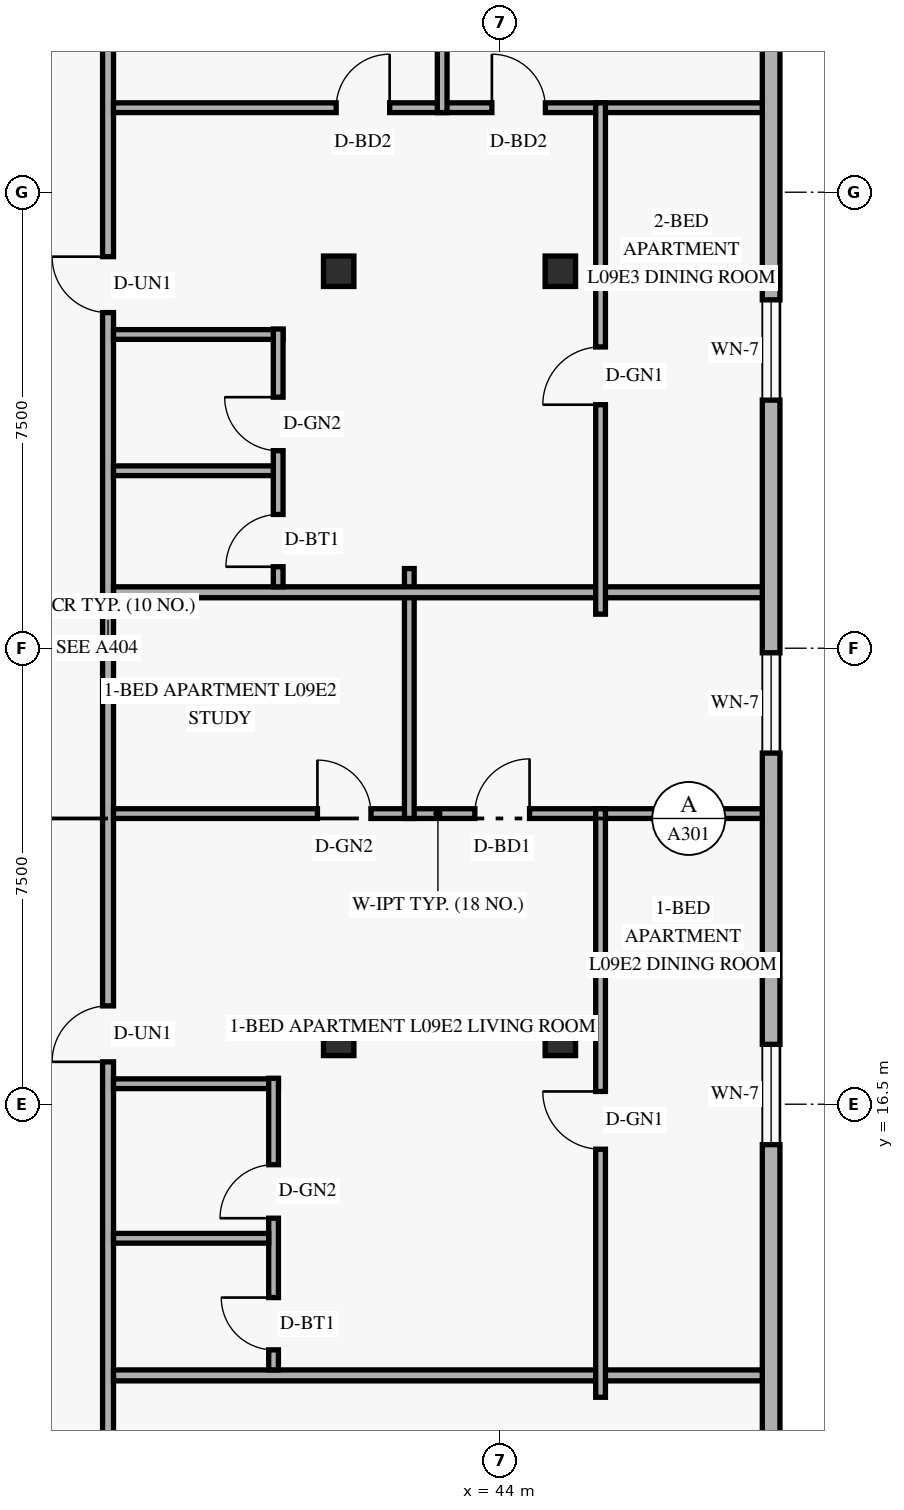
"""IFC4 building model, lengths in metres.
Left out: names, types, materials, properties, quantities, classifications, styles, units other than length and angle.
Written with IfcOpenShell. Run it as: python <this file> out.ifc"""

import sys

from ifc_helpers import new_model, si_unit, direction, frame, frame_2d, origin, origin_2d, place, context, subcontext, project, spatial, rectangle, hollow_rectangle, extrude, element, fill, save


model = new_model("IFC4")
c1 = context("Model", 3, precision=1e-05, world=origin(), true_north=direction((0.0, 1.0)))
c2 = subcontext(c1, "Body", "Model", "MODEL_VIEW")
j1 = project(units=[si_unit("LENGTHUNIT", "METRE"), si_unit("PLANEANGLEUNIT", "RADIAN")], contexts=[c1])
p1 = place(None, origin())
s1 = spatial("IfcSite", under=j1, at=p1, CompositionType="ELEMENT")
p2 = place(p1, origin())
s2 = spatial("IfcBuilding", under=s1, at=p2, CompositionType="ELEMENT")
p3 = place(p2, frame((0.0, 0.0, 38.4)))
s3 = spatial("IfcBuildingStorey", under=s2, at=p3, CompositionType="ELEMENT", Elevation=38.4)
for number, where, z_axis, x_axis in (
    (1, (41.28, 17.55, 0.0), (0.035, 0.0, 0.999), (0.0, 1.0, 0.0)),
    (2, (41.28, 30.2, 0.0), (0.035, 0.0, 0.999), (0.0, 1.0, 0.0)),
):
    element("IfcColumn", number, at=place(p3, frame(where, z_axis=z_axis, x_axis=x_axis)), inside=s3, PredefinedType="COLUMN", context=c2, shape_type="SweptSolid", body=[
        extrude(hollow_rectangle(XDim=0.5, YDim=0.5, WallThickness=0.022, at=origin_2d()), origin(), (0.0, 0.0, 1.0), 3.602),
    ])
for number, where, z_axis, x_axis in (
    (3, (44.884, 17.55, 0.0), (0.058, 0.0, 0.998), (0.0, 1.0, 0.0)),
    (4, (44.884, 30.2, 0.0), (0.058, 0.0, 0.998), (0.0, 1.0, 0.0)),
):
    element("IfcColumn", number, at=place(p3, frame(where, z_axis=z_axis, x_axis=x_axis)), inside=s3, PredefinedType="COLUMN", context=c2, shape_type="SweptSolid", body=[
        extrude(hollow_rectangle(XDim=0.5, YDim=0.5, WallThickness=0.022, at=origin_2d()), origin(), (0.0, 0.0, 1.0), 3.606),
    ])
p4 = place(p3, frame((48.455, 4.62, 0.0), z_axis=(0.0, 0.0, 1.0), x_axis=(0.0, 1.0, 0.0)))
e5 = element("IfcWall", 5, at=p4, inside=s3, PredefinedType="SOLIDWALL", context=c2, shape_type="SweptSolid", body=[
    extrude(rectangle(XDim=38.76, YDim=0.29, at=frame_2d((19.38, 0.0))), origin(), (0.0, 0.0, 1.0), 3.36),
])
p5 = place(p4, frame((2.885, 0.0, 0.85)))
e6 = element("IfcOpeningElement", 6, at=p5, cuts=e5, PredefinedType="OPENING", context=c2, shape_type="SweptSolid", body=[
    extrude(rectangle(XDim=1.65, YDim=1.6, at=frame_2d((0.825, 0.8))), frame((0.0, 0.155, 0.0), z_axis=(0.0, -1.0, 0.0), x_axis=(1.0, 0.0, 0.0)), (0.0, 0.0, 1.0), 0.31),
])
p6 = place(p4, frame((11.215, 0.0, 0.85)))
e7 = element("IfcOpeningElement", 7, at=p6, cuts=e5, PredefinedType="OPENING", context=c2, shape_type="SweptSolid", body=[
    extrude(rectangle(XDim=1.65, YDim=1.6, at=frame_2d((0.825, 0.8))), frame((0.0, 0.155, 0.0), z_axis=(0.0, -1.0, 0.0), x_axis=(1.0, 0.0, 0.0)), (0.0, 0.0, 1.0), 0.31),
])
p7 = place(p4, frame((17.655, 0.0, 0.85)))
e8 = element("IfcOpeningElement", 8, at=p7, cuts=e5, PredefinedType="OPENING", context=c2, shape_type="SweptSolid", body=[
    extrude(rectangle(XDim=1.65, YDim=1.6, at=frame_2d((0.825, 0.8))), frame((0.0, 0.155, 0.0), z_axis=(0.0, -1.0, 0.0), x_axis=(1.0, 0.0, 0.0)), (0.0, 0.0, 1.0), 0.31),
])
p8 = place(p4, frame((23.46, 0.0, 0.85)))
e9 = element("IfcOpeningElement", 9, at=p8, cuts=e5, PredefinedType="OPENING", context=c2, shape_type="SweptSolid", body=[
    extrude(rectangle(XDim=1.65, YDim=1.6, at=frame_2d((0.825, 0.8))), frame((0.0, 0.155, 0.0), z_axis=(0.0, -1.0, 0.0), x_axis=(1.0, 0.0, 0.0)), (0.0, 0.0, 1.0), 0.31),
])
p9 = place(p4, frame((29.44, 0.0, 0.85)))
e10 = element("IfcOpeningElement", 10, at=p9, cuts=e5, PredefinedType="OPENING", context=c2, shape_type="SweptSolid", body=[
    extrude(rectangle(XDim=1.65, YDim=1.6, at=frame_2d((0.825, 0.8))), frame((0.0, 0.155, 0.0), z_axis=(0.0, -1.0, 0.0), x_axis=(1.0, 0.0, 0.0)), (0.0, 0.0, 1.0), 0.31),
])
p10 = place(p4, frame((34.685, 0.0, 0.85)))
e11 = element("IfcOpeningElement", 11, at=p10, cuts=e5, PredefinedType="OPENING", context=c2, shape_type="SweptSolid", body=[
    extrude(rectangle(XDim=1.65, YDim=1.6, at=frame_2d((0.825, 0.8))), frame((0.0, 0.155, 0.0), z_axis=(0.0, -1.0, 0.0), x_axis=(1.0, 0.0, 0.0)), (0.0, 0.0, 1.0), 0.31),
])
p11 = place(p3, frame((37.55, 1.29, 0.0), z_axis=(0.0, 0.0, 1.0), x_axis=(0.0, 1.0, 0.0)))
e12 = element("IfcWall", 12, at=p11, inside=s3, PredefinedType="STANDARD", context=c2, shape_type="SweptSolid", body=[
    extrude(rectangle(XDim=45.42, YDim=0.18, at=frame_2d((22.71, 0.0))), origin(), (0.0, 0.0, 1.0), 2.649),
])
p12 = place(p11, frame((4.46, 0.0, 0.0)))
e13 = element("IfcOpeningElement", 13, at=p12, cuts=e12, PredefinedType="OPENING", context=c2, shape_type="SweptSolid", body=[
    extrude(rectangle(XDim=0.92, YDim=2.15, at=frame_2d((0.46, 1.075))), frame((0.0, 0.1, 0.0), z_axis=(0.0, -1.0, 0.0), x_axis=(1.0, 0.0, 0.0)), (0.0, 0.0, 1.0), 0.2),
])
p13 = place(p11, frame((15.907, 0.0, 0.0)))
e14 = element("IfcOpeningElement", 14, at=p13, cuts=e12, PredefinedType="OPENING", context=c2, shape_type="SweptSolid", body=[
    extrude(rectangle(XDim=0.92, YDim=2.15, at=frame_2d((0.46, 1.075))), frame((0.0, 0.1, 0.0), z_axis=(0.0, -1.0, 0.0), x_axis=(1.0, 0.0, 0.0)), (0.0, 0.0, 1.0), 0.2),
])
p14 = place(p11, frame((28.23, 0.0, 0.0)))
e15 = element("IfcOpeningElement", 15, at=p14, cuts=e12, PredefinedType="OPENING", context=c2, shape_type="SweptSolid", body=[
    extrude(rectangle(XDim=0.92, YDim=2.15, at=frame_2d((0.46, 1.075))), frame((0.0, 0.1, 0.0), z_axis=(0.0, -1.0, 0.0), x_axis=(1.0, 0.0, 0.0)), (0.0, 0.0, 1.0), 0.2),
])
p15 = place(p11, frame((40.02, 0.0, 0.0)))
e16 = element("IfcOpeningElement", 16, at=p15, cuts=e12, PredefinedType="OPENING", context=c2, shape_type="SweptSolid", body=[
    extrude(rectangle(XDim=0.92, YDim=2.15, at=frame_2d((0.46, 1.075))), frame((0.0, 0.1, 0.0), z_axis=(0.0, -1.0, 0.0), x_axis=(1.0, 0.0, 0.0)), (0.0, 0.0, 1.0), 0.2),
])
p16 = place(p3, frame((37.64, 12.04, 0.0), z_axis=(0.0, 0.0, 1.0), x_axis=(1.0, 0.0, 0.0)))
e17 = element("IfcWall", 17, at=p16, inside=s3, PredefinedType="PARTITIONING", context=c2, shape_type="SweptSolid", body=[
    extrude(rectangle(XDim=10.67, YDim=0.18, at=frame_2d((5.335, 0.0))), origin(), (0.0, 0.0, 1.0), 2.649),
])
p17 = place(p3, frame((37.64, 21.28, 0.0), z_axis=(0.0, 0.0, 1.0), x_axis=(1.0, 0.0, 0.0)))
e18 = element("IfcWall", 18, at=p17, inside=s3, PredefinedType="PARTITIONING", context=c2, shape_type="SweptSolid", body=[
    extrude(rectangle(XDim=10.67, YDim=0.16, at=frame_2d((5.335, 0.0))), origin(), (0.0, 0.0, 1.0), 2.649),
])
p18 = place(p17, frame((3.353, 0.0, 0.0)))
e19 = element("IfcOpeningElement", 19, at=p18, cuts=e18, PredefinedType="OPENING", context=c2, shape_type="SweptSolid", body=[
    extrude(rectangle(XDim=0.88, YDim=2.12, at=frame_2d((0.44, 1.06))), frame((0.0, 0.09, 0.0), z_axis=(0.0, -1.0, 0.0), x_axis=(1.0, 0.0, 0.0)), (0.0, 0.0, 1.0), 0.18),
])
p19 = place(p17, frame((5.942, 0.0, 0.0)))
e20 = element("IfcOpeningElement", 20, at=p19, cuts=e18, PredefinedType="OPENING", context=c2, shape_type="SweptSolid", body=[
    extrude(rectangle(XDim=0.9, YDim=2.14, at=frame_2d((0.45, 1.07))), frame((0.0, 0.09, 0.0), z_axis=(0.0, -1.0, 0.0), x_axis=(1.0, 0.0, 0.0)), (0.0, 0.0, 1.0), 0.18),
])
p20 = place(p3, frame((37.64, 16.837, 0.0), z_axis=(0.0, 0.0, 1.0), x_axis=(1.0, 0.0, 0.0)))
e21 = element("IfcWall", 21, at=p20, inside=s3, PredefinedType="PLUMBINGWALL", context=c2, shape_type="SweptSolid", body=[
    extrude(rectangle(XDim=2.712, YDim=0.16, at=frame_2d((1.356, 0.0))), origin(), (0.0, 0.0, 1.0), 3.36),
])
p21 = place(p3, frame((40.272, 12.13, 0.0), z_axis=(0.0, 0.0, 1.0), x_axis=(0.0, 1.0, 0.0)))
e22 = element("IfcWall", 22, at=p21, inside=s3, PredefinedType="PLUMBINGWALL", context=c2, shape_type="SweptSolid", body=[
    extrude(rectangle(XDim=4.797, YDim=0.16, at=frame_2d((2.398, 0.0))), origin(), (0.0, 0.0, 1.0), 2.932),
])
p22 = place(p21, frame((0.33, 0.0, 0.0)))
e23 = element("IfcOpeningElement", 23, at=p22, cuts=e22, PredefinedType="OPENING", context=c2, shape_type="SweptSolid", body=[
    extrude(rectangle(XDim=0.86, YDim=2.12, at=frame_2d((0.43, 1.06))), frame((0.0, 0.09, 0.0), z_axis=(0.0, -1.0, 0.0), x_axis=(1.0, 0.0, 0.0)), (0.0, 0.0, 1.0), 0.18),
])
p23 = place(p21, frame((2.495, 0.0, 0.0)))
e24 = element("IfcOpeningElement", 24, at=p23, cuts=e22, PredefinedType="OPENING", context=c2, shape_type="SweptSolid", body=[
    extrude(rectangle(XDim=0.88, YDim=2.12, at=frame_2d((0.44, 1.06))), frame((0.0, 0.09, 0.0), z_axis=(0.0, -1.0, 0.0), x_axis=(1.0, 0.0, 0.0)), (0.0, 0.0, 1.0), 0.18),
])
p24 = place(p3, frame((37.64, 14.295, 0.0), z_axis=(0.0, 0.0, 1.0), x_axis=(1.0, 0.0, 0.0)))
e25 = element("IfcWall", 25, at=p24, inside=s3, PredefinedType="PLUMBINGWALL", context=c2, shape_type="SweptSolid", body=[
    extrude(rectangle(XDim=2.552, YDim=0.16, at=frame_2d((1.276, 0.0))), origin(), (0.0, 0.0, 1.0), 3.36),
])
p25 = place(p3, frame((45.65, 11.68, 0.0), z_axis=(0.0, 0.0, 1.0), x_axis=(0.0, 1.0, 0.0)))
e26 = element("IfcWall", 26, at=p25, inside=s3, PredefinedType="PARTITIONING", context=c2, shape_type="SweptSolid", body=[
    extrude(rectangle(XDim=9.68, YDim=0.16, at=frame_2d((4.84, 0.0))), origin(), (0.0, 0.0, 1.0), 3.36),
])
p26 = place(p25, frame((4.08, 0.0, 0.0)))
e27 = element("IfcOpeningElement", 27, at=p26, cuts=e26, PredefinedType="OPENING", context=c2, shape_type="SweptSolid", body=[
    extrude(rectangle(XDim=0.95, YDim=2.15, at=frame_2d((0.475, 1.075))), frame((0.0, 0.09, 0.0), z_axis=(0.0, -1.0, 0.0), x_axis=(1.0, 0.0, 0.0)), (0.0, 0.0, 1.0), 0.18),
])
p27 = place(p3, frame((42.504, 21.2, 0.0), z_axis=(0.0, 0.0, 1.0), x_axis=(0.0, 1.0, 0.0)))
e28 = element("IfcWall", 28, at=p27, inside=s3, PredefinedType="PARTITIONING", context=c2, shape_type="SweptSolid", body=[
    extrude(rectangle(XDim=4.11, YDim=0.16, at=frame_2d((2.055, 0.0))), origin(), (0.0, 0.0, 1.0), 3.36),
])
p28 = place(p3, frame((37.64, 24.92, 0.0), z_axis=(0.0, 0.0, 1.0), x_axis=(1.0, 0.0, 0.0)))
e29 = element("IfcWall", 29, at=p28, inside=s3, PredefinedType="PARTITIONING", context=c2, shape_type="SweptSolid", body=[
    extrude(rectangle(XDim=10.67, YDim=0.18, at=frame_2d((5.335, 0.0))), origin(), (0.0, 0.0, 1.0), 2.649),
])
p29 = place(p3, frame((37.64, 32.89, 0.0), z_axis=(0.0, 0.0, 1.0), x_axis=(1.0, 0.0, 0.0)))
e30 = element("IfcWall", 30, at=p29, inside=s3, PredefinedType="PARTITIONING", context=c2, shape_type="SweptSolid", body=[
    extrude(rectangle(XDim=10.67, YDim=0.16, at=frame_2d((5.335, 0.0))), origin(), (0.0, 0.0, 1.0), 2.649),
])
p30 = place(p29, frame((3.662, 0.0, 0.0)))
e31 = element("IfcOpeningElement", 31, at=p30, cuts=e30, PredefinedType="OPENING", context=c2, shape_type="SweptSolid", body=[
    extrude(rectangle(XDim=0.88, YDim=2.14, at=frame_2d((0.44, 1.07))), frame((0.0, 0.09, 0.0), z_axis=(0.0, -1.0, 0.0), x_axis=(1.0, 0.0, 0.0)), (0.0, 0.0, 1.0), 0.18),
])
p31 = place(p29, frame((6.222, 0.0, 0.0)))
e32 = element("IfcOpeningElement", 32, at=p31, cuts=e30, PredefinedType="OPENING", context=c2, shape_type="SweptSolid", body=[
    extrude(rectangle(XDim=0.88, YDim=2.14, at=frame_2d((0.44, 1.07))), frame((0.0, 0.09, 0.0), z_axis=(0.0, -1.0, 0.0), x_axis=(1.0, 0.0, 0.0)), (0.0, 0.0, 1.0), 0.18),
])
p32 = place(p3, frame((37.64, 29.16, 0.0), z_axis=(0.0, 0.0, 1.0), x_axis=(1.0, 0.0, 0.0)))
e33 = element("IfcWall", 33, at=p32, inside=s3, PredefinedType="PLUMBINGWALL", context=c2, shape_type="SweptSolid", body=[
    extrude(rectangle(XDim=2.788, YDim=0.16, at=frame_2d((1.394, 0.0))), origin(), (0.0, 0.0, 1.0), 3.36),
])
p33 = place(p3, frame((40.348, 25.01, 0.0), z_axis=(0.0, 0.0, 1.0), x_axis=(0.0, 1.0, 0.0)))
e34 = element("IfcWall", 34, at=p33, inside=s3, PredefinedType="PLUMBINGWALL", context=c2, shape_type="SweptSolid", body=[
    extrude(rectangle(XDim=4.24, YDim=0.16, at=frame_2d((2.12, 0.0))), origin(), (0.0, 0.0, 1.0), 3.36),
])
p34 = place(p33, frame((0.33, 0.0, 0.0)))
e35 = element("IfcOpeningElement", 35, at=p34, cuts=e34, PredefinedType="OPENING", context=c2, shape_type="SweptSolid", body=[
    extrude(rectangle(XDim=0.86, YDim=2.12, at=frame_2d((0.43, 1.06))), frame((0.0, 0.09, 0.0), z_axis=(0.0, -1.0, 0.0), x_axis=(1.0, 0.0, 0.0)), (0.0, 0.0, 1.0), 0.18),
])
p35 = place(p33, frame((2.239, 0.0, 0.0)))
e36 = element("IfcOpeningElement", 36, at=p35, cuts=e34, PredefinedType="OPENING", context=c2, shape_type="SweptSolid", body=[
    extrude(rectangle(XDim=0.88, YDim=2.12, at=frame_2d((0.44, 1.06))), frame((0.0, 0.09, 0.0), z_axis=(0.0, -1.0, 0.0), x_axis=(1.0, 0.0, 0.0)), (0.0, 0.0, 1.0), 0.18),
])
p36 = place(p3, frame((37.64, 26.919, 0.0), z_axis=(0.0, 0.0, 1.0), x_axis=(1.0, 0.0, 0.0)))
e37 = element("IfcWall", 37, at=p36, inside=s3, PredefinedType="PLUMBINGWALL", context=c2, shape_type="SweptSolid", body=[
    extrude(rectangle(XDim=2.628, YDim=0.16, at=frame_2d((1.314, 0.0))), origin(), (0.0, 0.0, 1.0), 3.36),
])
p37 = place(p3, frame((45.65, 24.56, 0.0), z_axis=(0.0, 0.0, 1.0), x_axis=(0.0, 1.0, 0.0)))
e38 = element("IfcWall", 38, at=p37, inside=s3, PredefinedType="PARTITIONING", context=c2, shape_type="SweptSolid", body=[
    extrude(rectangle(XDim=8.41, YDim=0.16, at=frame_2d((4.205, 0.0))), origin(), (0.0, 0.0, 1.0), 3.36),
])
p38 = place(p37, frame((3.445, 0.0, 0.0)))
e39 = element("IfcOpeningElement", 39, at=p38, cuts=e38, PredefinedType="OPENING", context=c2, shape_type="SweptSolid", body=[
    extrude(rectangle(XDim=0.95, YDim=2.15, at=frame_2d((0.475, 1.075))), frame((0.0, 0.09, 0.0), z_axis=(0.0, -1.0, 0.0), x_axis=(1.0, 0.0, 0.0)), (0.0, 0.0, 1.0), 0.18),
])
p39 = place(p3, frame((43.045, 32.81, 0.0), z_axis=(0.0, 0.0, 1.0), x_axis=(0.0, 1.0, 0.0)))
e40 = element("IfcWall", 40, at=p39, inside=s3, PredefinedType="PARTITIONING", context=c2, shape_type="SweptSolid", body=[
    extrude(rectangle(XDim=4.46, YDim=0.16, at=frame_2d((2.23, 0.0))), origin(), (0.0, 0.0, 1.0), 2.932),
])
p40 = place(p6, origin())
e41 = element("IfcWindow", 41, at=p40, inside=s3, PartitioningType="SINGLE_PANEL", PredefinedType="WINDOW", context=c2, shape_type="SweptSolid", body=[
    extrude(rectangle(XDim=1.65, YDim=1.6, at=frame_2d((0.825, 0.8))), frame((0.0, 0.03, 0.0), z_axis=(0.0, -1.0, 0.0), x_axis=(1.0, 0.0, 0.0)), (0.0, 0.0, 1.0), 0.06),
])
fill(e7, e41)
p41 = place(p7, origin())
e42 = element("IfcWindow", 42, at=p41, inside=s3, PartitioningType="SINGLE_PANEL", PredefinedType="WINDOW", context=c2, shape_type="SweptSolid", body=[
    extrude(rectangle(XDim=1.65, YDim=1.6, at=frame_2d((0.825, 0.8))), frame((0.0, 0.03, 0.0), z_axis=(0.0, -1.0, 0.0), x_axis=(1.0, 0.0, 0.0)), (0.0, 0.0, 1.0), 0.06),
])
fill(e8, e42)
p42 = place(p8, origin())
e43 = element("IfcWindow", 43, at=p42, inside=s3, PartitioningType="SINGLE_PANEL", PredefinedType="WINDOW", context=c2, shape_type="SweptSolid", body=[
    extrude(rectangle(XDim=1.65, YDim=1.6, at=frame_2d((0.825, 0.8))), frame((0.0, 0.03, 0.0), z_axis=(0.0, -1.0, 0.0), x_axis=(1.0, 0.0, 0.0)), (0.0, 0.0, 1.0), 0.06),
])
fill(e9, e43)
p43 = place(p26, origin())
e44 = element("IfcDoor", 44, at=p43, inside=s3, OperationType="SINGLE_SWING_RIGHT", PredefinedType="DOOR", context=c2, shape_type="SweptSolid", body=[
    extrude(rectangle(XDim=0.95, YDim=2.15, at=frame_2d((0.475, 1.075))), frame((0.0, 0.025, 0.0), z_axis=(0.0, -1.0, 0.0), x_axis=(1.0, 0.0, 0.0)), (0.0, 0.0, 1.0), 0.05),
])
fill(e27, e44)
p44 = place(p13, origin())
e45 = element("IfcDoor", 45, at=p44, inside=s3, OperationType="SINGLE_SWING_LEFT", PredefinedType="DOOR", context=c2, shape_type="SweptSolid", body=[
    extrude(rectangle(XDim=0.92, YDim=2.15, at=frame_2d((0.46, 1.075))), frame((0.0, 0.025, 0.0), z_axis=(0.0, -1.0, 0.0), x_axis=(1.0, 0.0, 0.0)), (0.0, 0.0, 1.0), 0.05),
])
fill(e14, e45)
p45 = place(p22, origin())
e46 = element("IfcDoor", 46, at=p45, inside=s3, OperationType="SINGLE_SWING_RIGHT", PredefinedType="DOOR", context=c2, shape_type="SweptSolid", body=[
    extrude(rectangle(XDim=0.86, YDim=2.12, at=frame_2d((0.43, 1.06))), frame((0.0, 0.025, 0.0), z_axis=(0.0, -1.0, 0.0), x_axis=(1.0, 0.0, 0.0)), (0.0, 0.0, 1.0), 0.05),
])
fill(e23, e46)
p46 = place(p23, origin())
e47 = element("IfcDoor", 47, at=p46, inside=s3, OperationType="SINGLE_SWING_LEFT", PredefinedType="DOOR", context=c2, shape_type="SweptSolid", body=[
    extrude(rectangle(XDim=0.88, YDim=2.12, at=frame_2d((0.44, 1.06))), frame((0.0, 0.025, 0.0), z_axis=(0.0, -1.0, 0.0), x_axis=(1.0, 0.0, 0.0)), (0.0, 0.0, 1.0), 0.05),
])
fill(e24, e47)
p47 = place(p18, origin())
e48 = element("IfcDoor", 48, at=p47, inside=s3, OperationType="SINGLE_SWING_LEFT", PredefinedType="DOOR", context=c2, shape_type="SweptSolid", body=[
    extrude(rectangle(XDim=0.88, YDim=2.12, at=frame_2d((0.44, 1.06))), frame((0.0, 0.025, 0.0), z_axis=(0.0, -1.0, 0.0), x_axis=(1.0, 0.0, 0.0)), (0.0, 0.0, 1.0), 0.05),
])
fill(e19, e48)
p48 = place(p19, origin())
e49 = element("IfcDoor", 49, at=p48, inside=s3, OperationType="SINGLE_SWING_RIGHT", PredefinedType="DOOR", context=c2, shape_type="SweptSolid", body=[
    extrude(rectangle(XDim=0.9, YDim=2.14, at=frame_2d((0.45, 1.07))), frame((0.0, 0.025, 0.0), z_axis=(0.0, -1.0, 0.0), x_axis=(1.0, 0.0, 0.0)), (0.0, 0.0, 1.0), 0.05),
])
fill(e20, e49)
p49 = place(p38, origin())
e50 = element("IfcDoor", 50, at=p49, inside=s3, OperationType="SINGLE_SWING_LEFT", PredefinedType="DOOR", context=c2, shape_type="SweptSolid", body=[
    extrude(rectangle(XDim=0.95, YDim=2.15, at=frame_2d((0.475, 1.075))), frame((0.0, 0.025, 0.0), z_axis=(0.0, -1.0, 0.0), x_axis=(1.0, 0.0, 0.0)), (0.0, 0.0, 1.0), 0.05),
])
fill(e39, e50)
p50 = place(p14, origin())
e51 = element("IfcDoor", 51, at=p50, inside=s3, OperationType="SINGLE_SWING_RIGHT", PredefinedType="DOOR", context=c2, shape_type="SweptSolid", body=[
    extrude(rectangle(XDim=0.92, YDim=2.15, at=frame_2d((0.46, 1.075))), frame((0.0, 0.025, 0.0), z_axis=(0.0, -1.0, 0.0), x_axis=(1.0, 0.0, 0.0)), (0.0, 0.0, 1.0), 0.05),
])
fill(e15, e51)
p51 = place(p34, origin())
e52 = element("IfcDoor", 52, at=p51, inside=s3, OperationType="SINGLE_SWING_LEFT", PredefinedType="DOOR", context=c2, shape_type="SweptSolid", body=[
    extrude(rectangle(XDim=0.86, YDim=2.12, at=frame_2d((0.43, 1.06))), frame((0.0, 0.025, 0.0), z_axis=(0.0, -1.0, 0.0), x_axis=(1.0, 0.0, 0.0)), (0.0, 0.0, 1.0), 0.05),
])
fill(e35, e52)
p52 = place(p35, origin())
e53 = element("IfcDoor", 53, at=p52, inside=s3, OperationType="SINGLE_SWING_RIGHT", PredefinedType="DOOR", context=c2, shape_type="SweptSolid", body=[
    extrude(rectangle(XDim=0.88, YDim=2.12, at=frame_2d((0.44, 1.06))), frame((0.0, 0.025, 0.0), z_axis=(0.0, -1.0, 0.0), x_axis=(1.0, 0.0, 0.0)), (0.0, 0.0, 1.0), 0.05),
])
fill(e36, e53)
p53 = place(p30, origin())
e54 = element("IfcDoor", 54, at=p53, inside=s3, OperationType="SINGLE_SWING_RIGHT", PredefinedType="DOOR", context=c2, shape_type="SweptSolid", body=[
    extrude(rectangle(XDim=0.88, YDim=2.14, at=frame_2d((0.44, 1.07))), frame((0.0, 0.025, 0.0), z_axis=(0.0, -1.0, 0.0), x_axis=(1.0, 0.0, 0.0)), (0.0, 0.0, 1.0), 0.05),
])
fill(e31, e54)
p54 = place(p31, origin())
e55 = element("IfcDoor", 55, at=p54, inside=s3, OperationType="SINGLE_SWING_LEFT", PredefinedType="DOOR", context=c2, shape_type="SweptSolid", body=[
    extrude(rectangle(XDim=0.88, YDim=2.14, at=frame_2d((0.44, 1.07))), frame((0.0, 0.025, 0.0), z_axis=(0.0, -1.0, 0.0), x_axis=(1.0, 0.0, 0.0)), (0.0, 0.0, 1.0), 0.05),
])
fill(e32, e55)
save(model, sys.argv[1])
